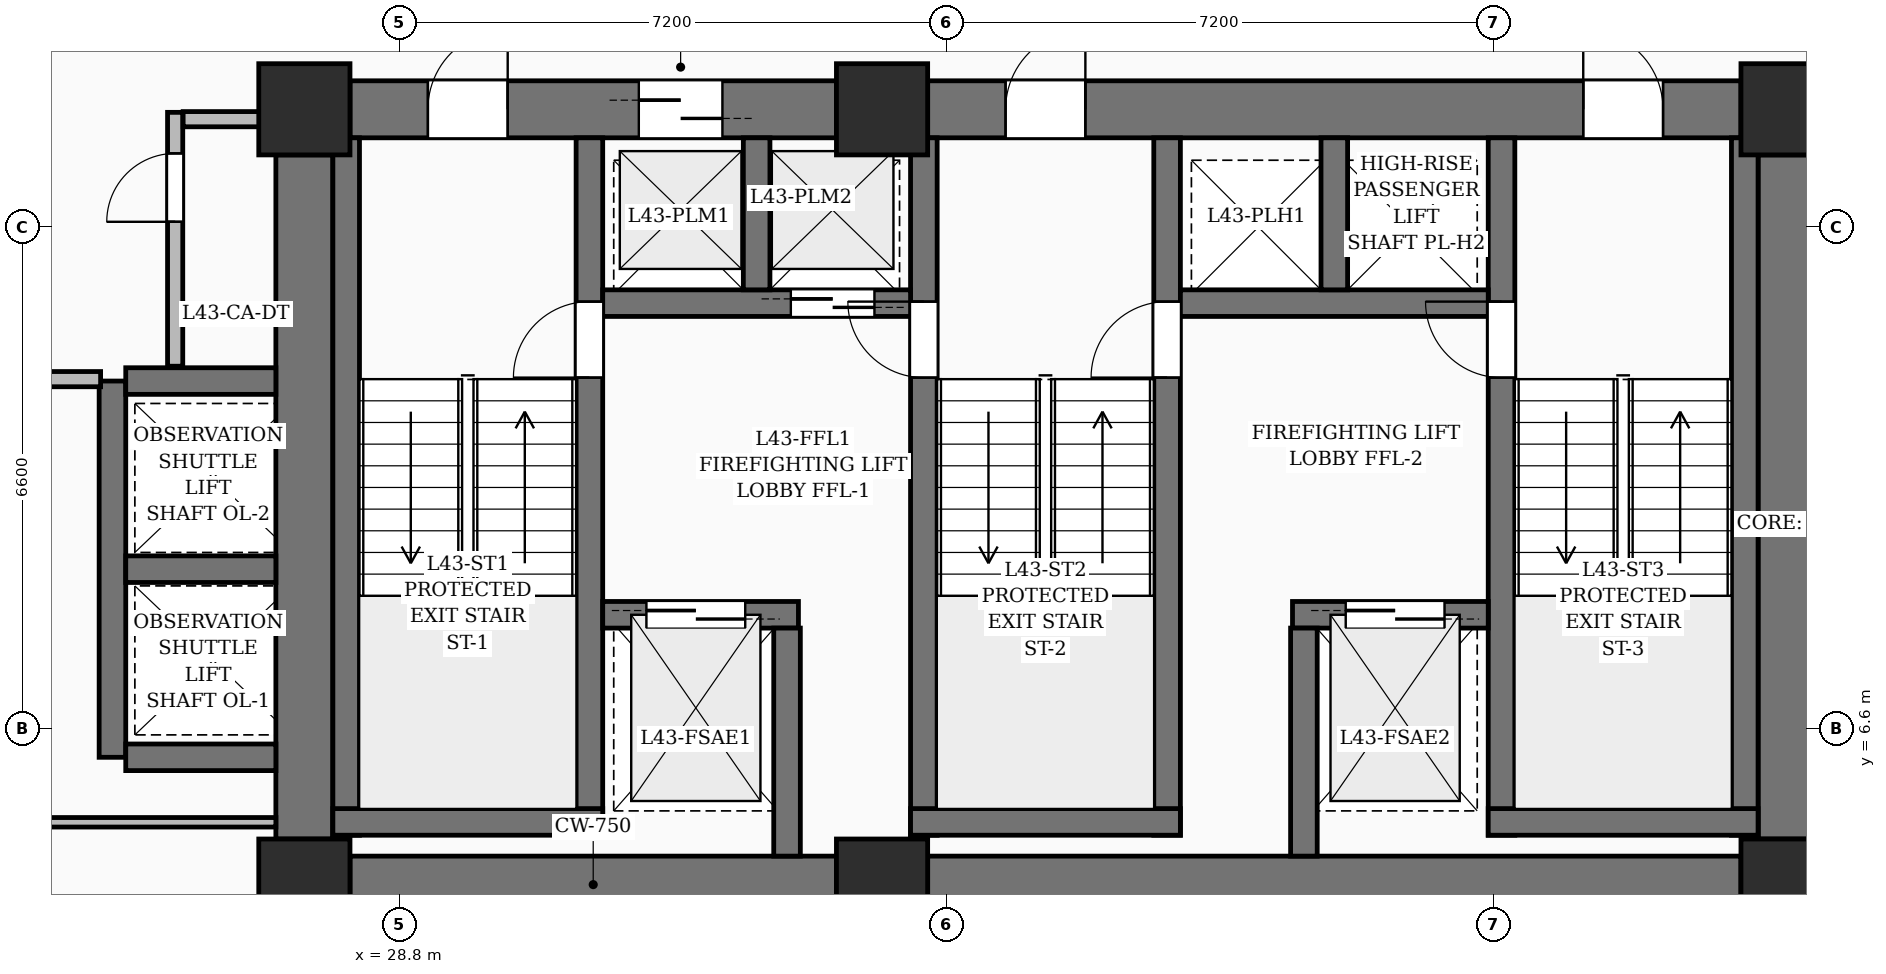
"""IFC4 building model, lengths in metres.
Left out: names, types, materials, properties, quantities, classifications, styles, units other than length and angle.
Written with IfcOpenShell. Run it as: python <this file> out.ifc"""

import sys

from ifc_helpers import new_model, si_unit, direction, frame, frame_2d, origin, origin_2d, place, context, subcontext, project, spatial, rectangle, extrude, element, fill, save


model = new_model("IFC4")
c1 = context("Model", 3, precision=1e-05, world=origin(), true_north=direction((0.0, 1.0)))
c2 = subcontext(c1, "Body", "Model", "MODEL_VIEW")
j1 = project(units=[si_unit("LENGTHUNIT", "METRE"), si_unit("PLANEANGLEUNIT", "RADIAN")], contexts=[c1])
p1 = place(None, origin())
s1 = spatial("IfcSite", under=j1, at=p1, CompositionType="ELEMENT")
p2 = place(p1, origin())
s2 = spatial("IfcBuilding", under=s1, at=p2, CompositionType="ELEMENT")
p3 = place(p2, frame((0.0, 0.0, 168.0)))
s3 = spatial("IfcBuildingStorey", under=s2, at=p3, CompositionType="ELEMENT", Elevation=168.0)
for number, where, z_axis, x_axis in (
    (1, (27.55, 4.55, 0.0), (0.0, 0.0, 1.0), (1.0, 0.0, 0.0)),
    (2, (35.15, 4.55, 0.0), (0.0, 0.0, 1.0), (1.0, 0.0, 0.0)),
    (3, (47.05, 4.55, 0.0), (0.0, 0.0, 1.0), (1.0, 0.0, 0.0)),
    (4, (27.55, 14.75, 0.0), (0.0, 0.0, 1.0), (1.0, 0.0, 0.0)),
    (5, (35.15, 14.75, 0.0), (0.0, 0.0, 1.0), (1.0, 0.0, 0.0)),
    (6, (47.05, 14.75, 0.0), (0.0, 0.0, 1.0), (1.0, 0.0, 0.0)),
):
    element("IfcColumn", number, at=place(p3, frame(where, z_axis=z_axis, x_axis=x_axis)), inside=s3, PredefinedType="COLUMN", context=c2, shape_type="SweptSolid", body=[
        extrude(rectangle(XDim=1.2, YDim=1.2, at=origin_2d()), origin(), (0.0, 0.0, 1.0), 3.6),
    ])
p4 = place(p3, frame((28.15, 4.55, 0.0), z_axis=(0.0, 0.0, 1.0), x_axis=(1.0, 0.0, 0.0)))
e7 = element("IfcWall", 7, at=p4, inside=s3, PredefinedType="SHEAR", context=c2, shape_type="SweptSolid", body=[
    extrude(rectangle(XDim=6.4, YDim=0.75, at=frame_2d((3.2, 0.0))), origin(), (0.0, 0.0, 1.0), 3.6),
])
p5 = place(p3, frame((35.75, 4.55, 0.0), z_axis=(0.0, 0.0, 1.0), x_axis=(1.0, 0.0, 0.0)))
e8 = element("IfcWall", 8, at=p5, inside=s3, PredefinedType="SHEAR", context=c2, shape_type="SweptSolid", body=[
    extrude(rectangle(XDim=10.7, YDim=0.75, at=frame_2d((5.35, 0.0))), origin(), (0.0, 0.0, 1.0), 3.6),
])
p6 = place(p3, frame((28.15, 14.75, 0.0), z_axis=(0.0, 0.0, 1.0), x_axis=(1.0, 0.0, 0.0)))
e9 = element("IfcWall", 9, at=p6, inside=s3, PredefinedType="SHEAR", context=c2, shape_type="SweptSolid", body=[
    extrude(rectangle(XDim=6.4, YDim=0.75, at=frame_2d((3.2, 0.0))), origin(), (0.0, 0.0, 1.0), 3.6),
])
p7 = place(p6, frame((1.025, 0.0, 0.0)))
e10 = element("IfcOpeningElement", 10, at=p7, cuts=e9, PredefinedType="OPENING", context=c2, shape_type="SweptSolid", body=[
    extrude(rectangle(XDim=1.05, YDim=2.15, at=frame_2d((0.525, 1.075))), frame((0.0, 0.385, 0.0), z_axis=(0.0, -1.0, 0.0), x_axis=(1.0, 0.0, 0.0)), (0.0, 0.0, 1.0), 0.77),
])
p8 = place(p6, frame((3.8, 0.0, 0.0)))
e11 = element("IfcOpeningElement", 11, at=p8, cuts=e9, PredefinedType="OPENING", context=c2, shape_type="SweptSolid", body=[
    extrude(rectangle(XDim=1.1, YDim=2.2, at=frame_2d((0.55, 1.1))), frame((0.0, 0.385, 0.0), z_axis=(0.0, -1.0, 0.0), x_axis=(1.0, 0.0, 0.0)), (0.0, 0.0, 1.0), 0.77),
])
p9 = place(p3, frame((35.75, 14.75, 0.0), z_axis=(0.0, 0.0, 1.0), x_axis=(1.0, 0.0, 0.0)))
e12 = element("IfcWall", 12, at=p9, inside=s3, PredefinedType="SHEAR", context=c2, shape_type="SweptSolid", body=[
    extrude(rectangle(XDim=10.7, YDim=0.75, at=frame_2d((5.35, 0.0))), origin(), (0.0, 0.0, 1.0), 3.6),
])
p10 = place(p9, frame((1.025, 0.0, 0.0)))
e13 = element("IfcOpeningElement", 13, at=p10, cuts=e12, PredefinedType="OPENING", context=c2, shape_type="SweptSolid", body=[
    extrude(rectangle(XDim=1.05, YDim=2.15, at=frame_2d((0.525, 1.075))), frame((0.0, 0.385, 0.0), z_axis=(0.0, -1.0, 0.0), x_axis=(1.0, 0.0, 0.0)), (0.0, 0.0, 1.0), 0.77),
])
p11 = place(p9, frame((8.625, 0.0, 0.0)))
e14 = element("IfcOpeningElement", 14, at=p11, cuts=e12, PredefinedType="OPENING", context=c2, shape_type="SweptSolid", body=[
    extrude(rectangle(XDim=1.05, YDim=2.15, at=frame_2d((0.525, 1.075))), frame((0.0, 0.385, 0.0), z_axis=(0.0, -1.0, 0.0), x_axis=(1.0, 0.0, 0.0)), (0.0, 0.0, 1.0), 0.77),
])
for number, where, z_axis, x_axis in (
    (15, (27.55, 5.15, 0.0), (0.0, 0.0, 1.0), (0.0, 1.0, 0.0)),
    (16, (47.05, 5.15, 0.0), (0.0, 0.0, 1.0), (0.0, 1.0, 0.0)),
):
    element("IfcWall", number, at=place(p3, frame(where, z_axis=z_axis, x_axis=x_axis)), inside=s3, PredefinedType="SHEAR", context=c2, shape_type="SweptSolid", body=[
        extrude(rectangle(XDim=9.0, YDim=0.75, at=frame_2d((4.5, 0.0))), origin(), (0.0, 0.0, 1.0), 3.6),
    ])
p12 = place(p3, frame((28.1, 5.2, 0.0), z_axis=(0.0, 0.0, 1.0), x_axis=(0.0, 1.0, 0.0)))
e17 = element("IfcWall", 17, at=p12, inside=s3, PredefinedType="SOLIDWALL", context=c2, shape_type="SweptSolid", body=[
    extrude(rectangle(XDim=9.175, YDim=0.35, at=frame_2d((4.587, 0.0))), origin(), (0.0, 0.0, 1.0), 3.6),
])
p13 = place(p3, frame((31.3, 5.2, 0.0), z_axis=(0.0, 0.0, 1.0), x_axis=(0.0, 1.0, 0.0)))
e18 = element("IfcWall", 18, at=p13, inside=s3, PredefinedType="SOLIDWALL", context=c2, shape_type="SweptSolid", body=[
    extrude(rectangle(XDim=9.175, YDim=0.35, at=frame_2d((4.587, 0.0))), origin(), (0.0, 0.0, 1.0), 3.6),
])
p14 = place(p13, frame((6.02, 0.0, 0.0)))
e19 = element("IfcOpeningElement", 19, at=p14, cuts=e18, PredefinedType="OPENING", context=c2, shape_type="SweptSolid", body=[
    extrude(rectangle(XDim=1.0, YDim=2.15, at=frame_2d((0.5, 1.075))), frame((0.0, 0.185, 0.0), z_axis=(0.0, -1.0, 0.0), x_axis=(1.0, 0.0, 0.0)), (0.0, 0.0, 1.0), 0.37),
])
p15 = place(p3, frame((27.925, 5.375, 0.0), z_axis=(0.0, 0.0, 1.0), x_axis=(1.0, 0.0, 0.0)))
e20 = element("IfcWall", 20, at=p15, inside=s3, PredefinedType="SOLIDWALL", context=c2, shape_type="SweptSolid", body=[
    extrude(rectangle(XDim=3.55, YDim=0.35, at=frame_2d((1.775, 0.0))), origin(), (0.0, 0.0, 1.0), 3.6),
])
p16 = place(p3, frame((35.7, 5.2, 0.0), z_axis=(0.0, 0.0, 1.0), x_axis=(0.0, 1.0, 0.0)))
e21 = element("IfcWall", 21, at=p16, inside=s3, PredefinedType="SOLIDWALL", context=c2, shape_type="SweptSolid", body=[
    extrude(rectangle(XDim=9.175, YDim=0.35, at=frame_2d((4.587, 0.0))), origin(), (0.0, 0.0, 1.0), 3.6),
])
p17 = place(p16, frame((6.02, 0.0, 0.0)))
e22 = element("IfcOpeningElement", 22, at=p17, cuts=e21, PredefinedType="OPENING", context=c2, shape_type="SweptSolid", body=[
    extrude(rectangle(XDim=1.0, YDim=2.15, at=frame_2d((0.5, 1.075))), frame((0.0, 0.185, 0.0), z_axis=(0.0, -1.0, 0.0), x_axis=(1.0, 0.0, 0.0)), (0.0, 0.0, 1.0), 0.37),
])
p18 = place(p3, frame((38.9, 5.2, 0.0), z_axis=(0.0, 0.0, 1.0), x_axis=(0.0, 1.0, 0.0)))
e23 = element("IfcWall", 23, at=p18, inside=s3, PredefinedType="SOLIDWALL", context=c2, shape_type="SweptSolid", body=[
    extrude(rectangle(XDim=9.175, YDim=0.35, at=frame_2d((4.587, 0.0))), origin(), (0.0, 0.0, 1.0), 3.6),
])
p19 = place(p18, frame((6.02, 0.0, 0.0)))
e24 = element("IfcOpeningElement", 24, at=p19, cuts=e23, PredefinedType="OPENING", context=c2, shape_type="SweptSolid", body=[
    extrude(rectangle(XDim=1.0, YDim=2.15, at=frame_2d((0.5, 1.075))), frame((0.0, 0.185, 0.0), z_axis=(0.0, -1.0, 0.0), x_axis=(1.0, 0.0, 0.0)), (0.0, 0.0, 1.0), 0.37),
])
p20 = place(p3, frame((35.525, 5.375, 0.0), z_axis=(0.0, 0.0, 1.0), x_axis=(1.0, 0.0, 0.0)))
e25 = element("IfcWall", 25, at=p20, inside=s3, PredefinedType="SOLIDWALL", context=c2, shape_type="SweptSolid", body=[
    extrude(rectangle(XDim=3.55, YDim=0.35, at=frame_2d((1.775, 0.0))), origin(), (0.0, 0.0, 1.0), 3.6),
])
p21 = place(p3, frame((43.3, 5.2, 0.0), z_axis=(0.0, 0.0, 1.0), x_axis=(0.0, 1.0, 0.0)))
e26 = element("IfcWall", 26, at=p21, inside=s3, PredefinedType="SOLIDWALL", context=c2, shape_type="SweptSolid", body=[
    extrude(rectangle(XDim=9.175, YDim=0.35, at=frame_2d((4.587, 0.0))), origin(), (0.0, 0.0, 1.0), 3.6),
])
p22 = place(p21, frame((6.02, 0.0, 0.0)))
e27 = element("IfcOpeningElement", 27, at=p22, cuts=e26, PredefinedType="OPENING", context=c2, shape_type="SweptSolid", body=[
    extrude(rectangle(XDim=1.0, YDim=2.15, at=frame_2d((0.5, 1.075))), frame((0.0, 0.185, 0.0), z_axis=(0.0, -1.0, 0.0), x_axis=(1.0, 0.0, 0.0)), (0.0, 0.0, 1.0), 0.37),
])
p23 = place(p3, frame((46.5, 5.2, 0.0), z_axis=(0.0, 0.0, 1.0), x_axis=(0.0, 1.0, 0.0)))
e28 = element("IfcWall", 28, at=p23, inside=s3, PredefinedType="SOLIDWALL", context=c2, shape_type="SweptSolid", body=[
    extrude(rectangle(XDim=9.175, YDim=0.35, at=frame_2d((4.587, 0.0))), origin(), (0.0, 0.0, 1.0), 3.6),
])
p24 = place(p3, frame((43.125, 5.375, 0.0), z_axis=(0.0, 0.0, 1.0), x_axis=(1.0, 0.0, 0.0)))
e29 = element("IfcWall", 29, at=p24, inside=s3, PredefinedType="SOLIDWALL", context=c2, shape_type="SweptSolid", body=[
    extrude(rectangle(XDim=3.55, YDim=0.35, at=frame_2d((1.775, 0.0))), origin(), (0.0, 0.0, 1.0), 3.6),
])
p25 = place(p3, frame((31.475, 8.1, 0.0), z_axis=(0.0, 0.0, 1.0), x_axis=(1.0, 0.0, 0.0)))
e30 = element("IfcWall", 30, at=p25, inside=s3, PredefinedType="SOLIDWALL", context=c2, shape_type="SweptSolid", body=[
    extrude(rectangle(XDim=2.575, YDim=0.35, at=frame_2d((1.288, 0.0))), origin(), (0.0, 0.0, 1.0), 3.6),
])
p26 = place(p25, frame((0.575, 0.0, 0.0)))
e31 = element("IfcOpeningElement", 31, at=p26, cuts=e30, PredefinedType="OPENING", context=c2, shape_type="SweptSolid", body=[
    extrude(rectangle(XDim=1.3, YDim=2.25, at=frame_2d((0.65, 1.125))), frame((0.0, 0.185, 0.0), z_axis=(0.0, -1.0, 0.0), x_axis=(1.0, 0.0, 0.0)), (0.0, 0.0, 1.0), 0.37),
])
p27 = place(p3, frame((40.55, 8.1, 0.0), z_axis=(0.0, 0.0, 1.0), x_axis=(1.0, 0.0, 0.0)))
e32 = element("IfcWall", 32, at=p27, inside=s3, PredefinedType="SOLIDWALL", context=c2, shape_type="SweptSolid", body=[
    extrude(rectangle(XDim=2.575, YDim=0.35, at=frame_2d((1.288, 0.0))), origin(), (0.0, 0.0, 1.0), 3.6),
])
p28 = place(p27, frame((0.7, 0.0, 0.0)))
e33 = element("IfcOpeningElement", 33, at=p28, cuts=e32, PredefinedType="OPENING", context=c2, shape_type="SweptSolid", body=[
    extrude(rectangle(XDim=1.3, YDim=2.25, at=frame_2d((0.65, 1.125))), frame((0.0, 0.185, 0.0), z_axis=(0.0, -1.0, 0.0), x_axis=(1.0, 0.0, 0.0)), (0.0, 0.0, 1.0), 0.37),
])
for number, where, z_axis, x_axis in (
    (34, (33.9, 4.925, 0.0), (0.0, 0.0, 1.0), (0.0, 1.0, 0.0)),
    (35, (40.7, 4.925, 0.0), (0.0, 0.0, 1.0), (0.0, 1.0, 0.0)),
):
    element("IfcWall", number, at=place(p3, frame(where, z_axis=z_axis, x_axis=x_axis)), inside=s3, PredefinedType="SOLIDWALL", context=c2, shape_type="SweptSolid", body=[
        extrude(rectangle(XDim=3.0, YDim=0.35, at=frame_2d((1.5, 0.0))), origin(), (0.0, 0.0, 1.0), 3.6),
    ])
p29 = place(p3, frame((31.475, 12.2, 0.0), z_axis=(0.0, 0.0, 1.0), x_axis=(1.0, 0.0, 0.0)))
e36 = element("IfcWall", 36, at=p29, inside=s3, PredefinedType="SOLIDWALL", context=c2, shape_type="SweptSolid", body=[
    extrude(rectangle(XDim=4.05, YDim=0.35, at=frame_2d((2.025, 0.0))), origin(), (0.0, 0.0, 1.0), 3.6),
])
p30 = place(p29, frame((2.475, 0.0, 0.0)))
e37 = element("IfcOpeningElement", 37, at=p30, cuts=e36, PredefinedType="OPENING", context=c2, shape_type="SweptSolid", body=[
    extrude(rectangle(XDim=1.1, YDim=2.2, at=frame_2d((0.55, 1.1))), frame((0.0, 0.185, 0.0), z_axis=(0.0, -1.0, 0.0), x_axis=(1.0, 0.0, 0.0)), (0.0, 0.0, 1.0), 0.37),
])
p31 = place(p3, frame((33.5, 12.375, 0.0), z_axis=(0.0, 0.0, 1.0), x_axis=(0.0, 1.0, 0.0)))
e38 = element("IfcWall", 38, at=p31, inside=s3, PredefinedType="SOLIDWALL", context=c2, shape_type="SweptSolid", body=[
    extrude(rectangle(XDim=2.0, YDim=0.35, at=frame_2d((1.0, 0.0))), origin(), (0.0, 0.0, 1.0), 3.6),
])
p32 = place(p3, frame((39.075, 12.2, 0.0), z_axis=(0.0, 0.0, 1.0), x_axis=(1.0, 0.0, 0.0)))
e39 = element("IfcWall", 39, at=p32, inside=s3, PredefinedType="SOLIDWALL", context=c2, shape_type="SweptSolid", body=[
    extrude(rectangle(XDim=4.05, YDim=0.35, at=frame_2d((2.025, 0.0))), origin(), (0.0, 0.0, 1.0), 3.6),
])
p33 = place(p3, frame((41.1, 12.375, 0.0), z_axis=(0.0, 0.0, 1.0), x_axis=(0.0, 1.0, 0.0)))
e40 = element("IfcWall", 40, at=p33, inside=s3, PredefinedType="SOLIDWALL", context=c2, shape_type="SweptSolid", body=[
    extrude(rectangle(XDim=2.0, YDim=0.35, at=frame_2d((1.0, 0.0))), origin(), (0.0, 0.0, 1.0), 3.6),
])
p34 = place(p3, frame((25.025, 6.225, 0.0), z_axis=(0.0, 0.0, 1.0), x_axis=(0.0, 1.0, 0.0)))
e41 = element("IfcWall", 41, at=p34, inside=s3, PredefinedType="SOLIDWALL", context=c2, shape_type="SweptSolid", body=[
    extrude(rectangle(XDim=4.95, YDim=0.35, at=frame_2d((2.475, 0.0))), origin(), (0.0, 0.0, 1.0), 3.6),
])
for number, where, z_axis, x_axis in (
    (42, (25.2, 6.225, 0.0), (0.0, 0.0, 1.0), (1.0, 0.0, 0.0)),
    (43, (25.2, 8.7, 0.0), (0.0, 0.0, 1.0), (1.0, 0.0, 0.0)),
    (44, (25.2, 11.175, 0.0), (0.0, 0.0, 1.0), (1.0, 0.0, 0.0)),
):
    element("IfcWall", number, at=place(p3, frame(where, z_axis=z_axis, x_axis=x_axis)), inside=s3, PredefinedType="SOLIDWALL", context=c2, shape_type="SweptSolid", body=[
        extrude(rectangle(XDim=1.975, YDim=0.35, at=frame_2d((0.988, 0.0))), origin(), (0.0, 0.0, 1.0), 3.6),
    ])
p35 = place(p3, frame((25.85, 11.37, 0.0), z_axis=(0.0, 0.0, 1.0), x_axis=(0.0, 1.0, 0.0)))
e45 = element("IfcWall", 45, at=p35, inside=s3, PredefinedType="PARTITIONING", context=c2, shape_type="SweptSolid", body=[
    extrude(rectangle(XDim=3.34, YDim=0.2, at=frame_2d((1.67, 0.0))), origin(), (0.0, 0.0, 1.0), 3.35),
])
p36 = place(p35, frame((1.9, 0.0, 0.0)))
e46 = element("IfcOpeningElement", 46, at=p36, cuts=e45, PredefinedType="OPENING", context=c2, shape_type="SweptSolid", body=[
    extrude(rectangle(XDim=0.9, YDim=2.1, at=frame_2d((0.45, 1.05))), frame((0.0, 0.11, 0.0), z_axis=(0.0, -1.0, 0.0), x_axis=(1.0, 0.0, 0.0)), (0.0, 0.0, 1.0), 0.22),
])
p37 = place(p3, frame((25.955, 14.62, 0.0), z_axis=(0.0, 0.0, 1.0), x_axis=(1.0, 0.0, 0.0)))
e47 = element("IfcWall", 47, at=p37, inside=s3, PredefinedType="PARTITIONING", context=c2, shape_type="SweptSolid", body=[
    extrude(rectangle(XDim=1.205, YDim=0.2, at=frame_2d((0.603, 0.0))), origin(), (0.0, 0.0, 1.0), 3.35),
])
p38 = place(p3, frame((21.485, 11.2, 0.0), z_axis=(0.0, 0.0, 1.0), x_axis=(1.0, 0.0, 0.0)))
e48 = element("IfcWall", 48, at=p38, inside=s3, PredefinedType="PARTITIONING", context=c2, shape_type="SweptSolid", body=[
    extrude(rectangle(XDim=3.384, YDim=0.2, at=frame_2d((1.692, 0.0))), origin(), (0.0, 0.0, 1.0), 3.35),
])
p39 = place(p38, frame((1.25, 0.0, 0.0)))
e49 = element("IfcOpeningElement", 49, at=p39, cuts=e48, PredefinedType="OPENING", context=c2, shape_type="SweptSolid", body=[
    extrude(rectangle(XDim=1.0, YDim=2.2, at=frame_2d((0.5, 1.1))), frame((0.0, 0.11, 0.0), z_axis=(0.0, -1.0, 0.0), x_axis=(1.0, 0.0, 0.0)), (0.0, 0.0, 1.0), 0.22),
])
p40 = place(p3, frame((23.02, 5.37, 0.0), z_axis=(0.0, 0.0, 1.0), x_axis=(1.0, 0.0, 0.0)))
e50 = element("IfcWall", 50, at=p40, inside=s3, PredefinedType="PARTITIONING", context=c2, shape_type="SweptSolid", body=[
    extrude(rectangle(XDim=4.155, YDim=0.125, at=frame_2d((2.078, 0.0))), origin(), (0.0, 0.0, 1.0), 3.35),
])
p41 = place(p7, origin())
e51 = element("IfcDoor", 51, at=p41, inside=s3, OperationType="SINGLE_SWING_RIGHT", PredefinedType="DOOR", context=c2, shape_type="SweptSolid", body=[
    extrude(rectangle(XDim=1.05, YDim=2.15, at=frame_2d((0.525, 1.075))), frame((0.0, 0.025, 0.0), z_axis=(0.0, -1.0, 0.0), x_axis=(1.0, 0.0, 0.0)), (0.0, 0.0, 1.0), 0.05),
])
fill(e10, e51)
p42 = place(p10, origin())
e52 = element("IfcDoor", 52, at=p42, inside=s3, OperationType="SINGLE_SWING_RIGHT", PredefinedType="DOOR", context=c2, shape_type="SweptSolid", body=[
    extrude(rectangle(XDim=1.05, YDim=2.15, at=frame_2d((0.525, 1.075))), frame((0.0, 0.025, 0.0), z_axis=(0.0, -1.0, 0.0), x_axis=(1.0, 0.0, 0.0)), (0.0, 0.0, 1.0), 0.05),
])
fill(e13, e52)
p43 = place(p11, origin())
e53 = element("IfcDoor", 53, at=p43, inside=s3, OperationType="SINGLE_SWING_LEFT", PredefinedType="DOOR", context=c2, shape_type="SweptSolid", body=[
    extrude(rectangle(XDim=1.05, YDim=2.15, at=frame_2d((0.525, 1.075))), frame((0.0, 0.025, 0.0), z_axis=(0.0, -1.0, 0.0), x_axis=(1.0, 0.0, 0.0)), (0.0, 0.0, 1.0), 0.05),
])
fill(e14, e53)
p44 = place(p14, origin())
e54 = element("IfcDoor", 54, at=p44, inside=s3, OperationType="SINGLE_SWING_LEFT", PredefinedType="DOOR", context=c2, shape_type="SweptSolid", body=[
    extrude(rectangle(XDim=1.0, YDim=2.15, at=frame_2d((0.5, 1.075))), frame((0.0, 0.025, 0.0), z_axis=(0.0, -1.0, 0.0), x_axis=(1.0, 0.0, 0.0)), (0.0, 0.0, 1.0), 0.05),
])
fill(e19, e54)
p45 = place(p17, origin())
e55 = element("IfcDoor", 55, at=p45, inside=s3, OperationType="SINGLE_SWING_RIGHT", PredefinedType="DOOR", context=c2, shape_type="SweptSolid", body=[
    extrude(rectangle(XDim=1.0, YDim=2.15, at=frame_2d((0.5, 1.075))), frame((0.0, 0.025, 0.0), z_axis=(0.0, -1.0, 0.0), x_axis=(1.0, 0.0, 0.0)), (0.0, 0.0, 1.0), 0.05),
])
fill(e22, e55)
p46 = place(p19, origin())
e56 = element("IfcDoor", 56, at=p46, inside=s3, OperationType="SINGLE_SWING_LEFT", PredefinedType="DOOR", context=c2, shape_type="SweptSolid", body=[
    extrude(rectangle(XDim=1.0, YDim=2.15, at=frame_2d((0.5, 1.075))), frame((0.0, 0.025, 0.0), z_axis=(0.0, -1.0, 0.0), x_axis=(1.0, 0.0, 0.0)), (0.0, 0.0, 1.0), 0.05),
])
fill(e24, e56)
p47 = place(p22, origin())
e57 = element("IfcDoor", 57, at=p47, inside=s3, OperationType="SINGLE_SWING_RIGHT", PredefinedType="DOOR", context=c2, shape_type="SweptSolid", body=[
    extrude(rectangle(XDim=1.0, YDim=2.15, at=frame_2d((0.5, 1.075))), frame((0.0, 0.025, 0.0), z_axis=(0.0, -1.0, 0.0), x_axis=(1.0, 0.0, 0.0)), (0.0, 0.0, 1.0), 0.05),
])
fill(e27, e57)
p48 = place(p26, origin())
e58 = element("IfcDoor", 58, at=p48, inside=s3, OperationType="DOUBLE_DOOR_SLIDING", PredefinedType="DOOR", context=c2, shape_type="SweptSolid", body=[
    extrude(rectangle(XDim=1.3, YDim=2.25, at=frame_2d((0.65, 1.125))), frame((0.0, 0.025, 0.0), z_axis=(0.0, -1.0, 0.0), x_axis=(1.0, 0.0, 0.0)), (0.0, 0.0, 1.0), 0.05),
])
fill(e31, e58)
p49 = place(p28, origin())
e59 = element("IfcDoor", 59, at=p49, inside=s3, OperationType="DOUBLE_DOOR_SLIDING", PredefinedType="DOOR", context=c2, shape_type="SweptSolid", body=[
    extrude(rectangle(XDim=1.3, YDim=2.25, at=frame_2d((0.65, 1.125))), frame((0.0, 0.025, 0.0), z_axis=(0.0, -1.0, 0.0), x_axis=(1.0, 0.0, 0.0)), (0.0, 0.0, 1.0), 0.05),
])
fill(e33, e59)
p50 = place(p8, origin())
e60 = element("IfcDoor", 60, at=p50, inside=s3, OperationType="DOUBLE_DOOR_SLIDING", PredefinedType="DOOR", context=c2, shape_type="SweptSolid", body=[
    extrude(rectangle(XDim=1.1, YDim=2.2, at=frame_2d((0.55, 1.1))), frame((0.0, 0.025, 0.0), z_axis=(0.0, -1.0, 0.0), x_axis=(1.0, 0.0, 0.0)), (0.0, 0.0, 1.0), 0.05),
])
fill(e11, e60)
p51 = place(p30, origin())
e61 = element("IfcDoor", 61, at=p51, inside=s3, OperationType="DOUBLE_DOOR_SLIDING", PredefinedType="DOOR", context=c2, shape_type="SweptSolid", body=[
    extrude(rectangle(XDim=1.1, YDim=2.2, at=frame_2d((0.55, 1.1))), frame((0.0, 0.025, 0.0), z_axis=(0.0, -1.0, 0.0), x_axis=(1.0, 0.0, 0.0)), (0.0, 0.0, 1.0), 0.05),
])
fill(e37, e61)
p52 = place(p36, origin())
e62 = element("IfcDoor", 62, at=p52, inside=s3, OperationType="SINGLE_SWING_LEFT", PredefinedType="DOOR", context=c2, shape_type="SweptSolid", body=[
    extrude(rectangle(XDim=0.9, YDim=2.1, at=frame_2d((0.45, 1.05))), frame((0.0, 0.025, 0.0), z_axis=(0.0, -1.0, 0.0), x_axis=(1.0, 0.0, 0.0)), (0.0, 0.0, 1.0), 0.05),
])
fill(e46, e62)
save(model, sys.argv[1])
